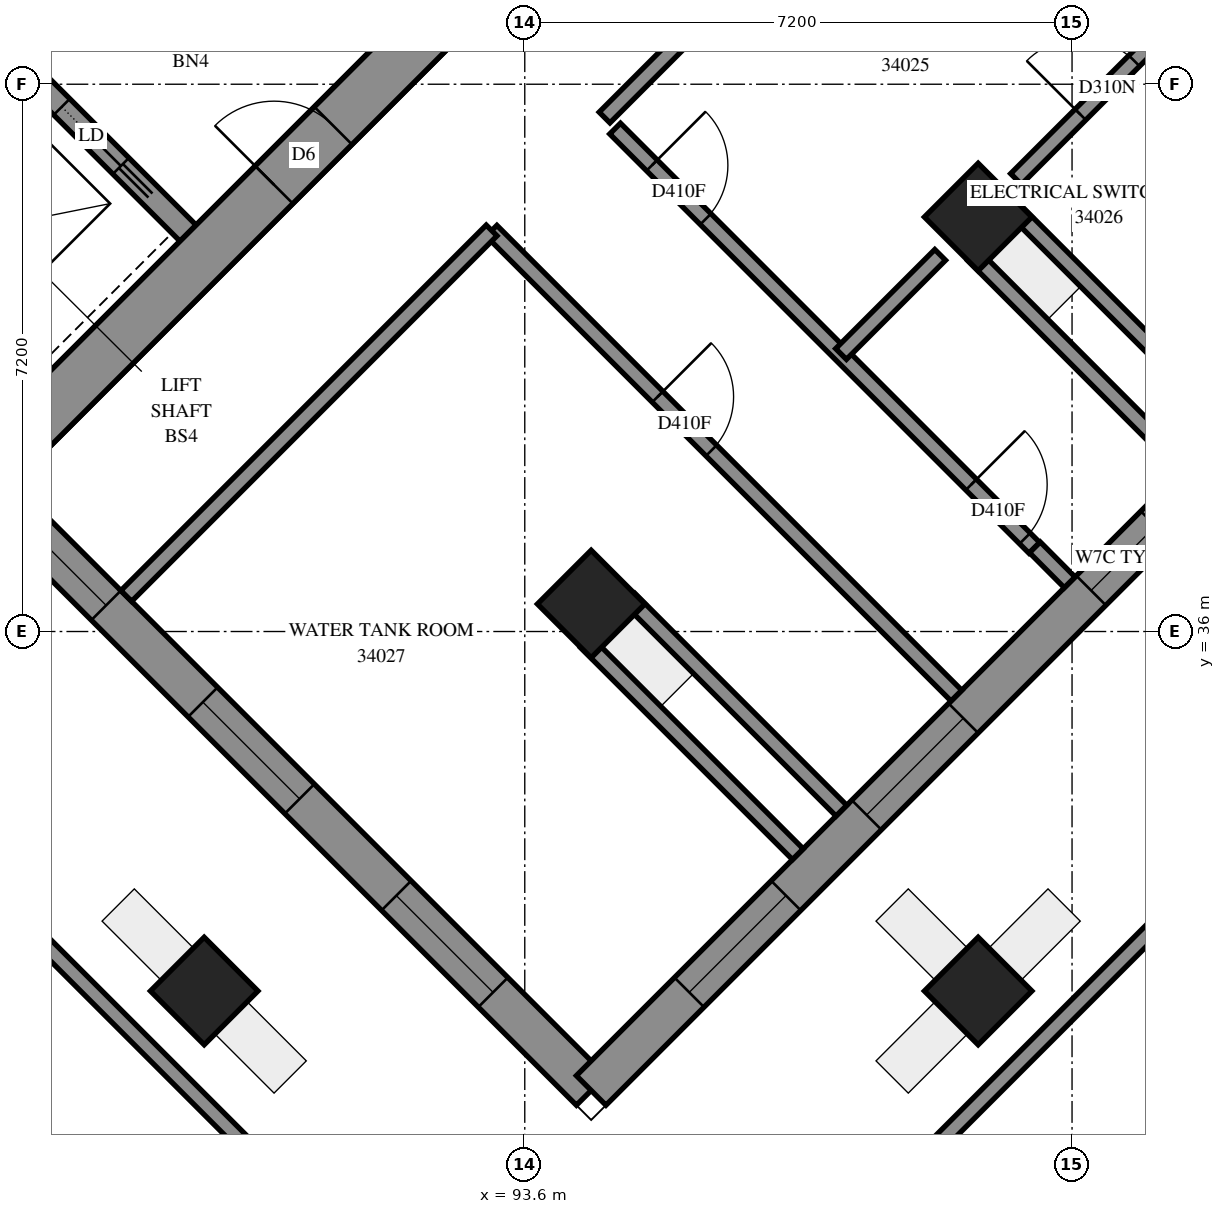
"""IFC4 building model, lengths in metres.
Left out: names, types, materials, properties, quantities, classifications, styles, units other than length and angle.
Written with IfcOpenShell. Run it as: python <this file> out.ifc"""

import sys

from ifc_helpers import new_model, si_unit, direction, frame, frame_2d, origin, origin_2d, place, context, subcontext, project, spatial, polyline, rectangle, outline, extrude, element, fill, save


model = new_model("IFC4")
c1 = context("Model", 3, precision=1e-05, world=origin(), true_north=direction((0.0, 1.0)))
c2 = subcontext(c1, "Body", "Model", "MODEL_VIEW")
j1 = project(units=[si_unit("LENGTHUNIT", "METRE"), si_unit("PLANEANGLEUNIT", "RADIAN")], contexts=[c1])
p1 = place(None, origin())
s1 = spatial("IfcSite", under=j1, at=p1, CompositionType="ELEMENT")
p2 = place(p1, origin())
s2 = spatial("IfcBuilding", under=s1, at=p2, CompositionType="ELEMENT")
p3 = place(p2, frame((0.0, 0.0, 126.2)))
s3 = spatial("IfcBuildingStorey", under=s2, at=p3, CompositionType="ELEMENT", Elevation=126.2)
for number, where, z_axis, x_axis in (
    (1, (99.565, 41.453, 0.0), (0.0, 0.0, 1.0), (0.707, -0.707, 0.0)),
    (2, (94.474, 36.362, 0.0), (0.0, 0.0, 1.0), (0.707, -0.707, 0.0)),
):
    element("IfcColumn", number, at=place(p3, frame(where, z_axis=z_axis, x_axis=x_axis)), inside=s3, PredefinedType="COLUMN", context=c2, shape_type="SweptSolid", body=[
        extrude(rectangle(XDim=1.0, YDim=1.0, at=origin_2d()), origin(), (0.0, 0.0, 1.0), 4.7),
    ])
for number, where, z_axis, x_axis in (
    (3, (89.382, 31.271, -0.3), (0.0, 0.0, 1.0), (0.707, -0.707, 0.0)),
    (4, (99.565, 31.271, -0.3), (0.0, 0.0, 1.0), (0.707, -0.707, 0.0)),
):
    element("IfcColumn", number, at=place(p3, frame(where, z_axis=z_axis, x_axis=x_axis)), inside=s3, PredefinedType="COLUMN", context=c2, shape_type="SweptSolid", body=[
        extrude(rectangle(XDim=1.0, YDim=1.0, at=origin_2d()), origin(), (0.0, 0.0, 1.0), 5.0),
    ])
p4 = place(p3, frame((87.084, 38.66, -0.3), z_axis=(0.0, 0.0, 1.0), x_axis=(0.7071067812, 0.7071067812, 0.0)))
e5 = element("IfcWall", 5, at=p4, inside=s3, PredefinedType="SHEAR", context=c2, shape_type="SweptSolid", body=[
    extrude(rectangle(XDim=14.4, YDim=0.7, at=frame_2d((7.2, 0.0))), origin(), (0.0, 0.0, 1.0), 4.3),
])
p5 = place(p4, frame((4.55, 0.0, 0.3)))
e6 = element("IfcOpeningElement", 6, at=p5, cuts=e5, PredefinedType="OPENING", context=c2, shape_type="SweptSolid", body=[
    extrude(rectangle(XDim=1.1, YDim=2.1, at=frame_2d((0.55, 1.05))), frame((0.0, 0.36, 0.0), z_axis=(0.0, -1.0, 0.0), x_axis=(1.0, 0.0, 0.0)), (0.0, 0.0, 1.0), 0.72),
])
p6 = place(p4, frame((11.35, 0.0, 0.3)))
e7 = element("IfcOpeningElement", 7, at=p6, cuts=e5, PredefinedType="OPENING", context=c2, shape_type="SweptSolid", body=[
    extrude(rectangle(XDim=1.1, YDim=2.1, at=frame_2d((0.55, 1.05))), frame((0.0, 0.36, 0.0), z_axis=(0.0, -1.0, 0.0), x_axis=(1.0, 0.0, 0.0)), (0.0, 0.0, 1.0), 0.72),
])
p7 = place(p3, frame((78.988, 51.423, 0.0), z_axis=(0.0, 0.0, 1.0), x_axis=(0.7071067812, -0.7071067812, 0.0)))
e8 = element("IfcWall", 8, at=p7, inside=s3, PredefinedType="SOLIDWALL", context=c2, shape_type="SweptSolid", body=[
    extrude(rectangle(XDim=14.4, YDim=0.3, at=frame_2d((7.2, 0.0))), origin(), (0.0, 0.0, 1.0), 4.7),
])
p8 = place(p7, frame((1.25, 0.0, 0.0)))
e9 = element("IfcOpeningElement", 9, at=p8, cuts=e8, PredefinedType="OPENING", context=c2, shape_type="SweptSolid", body=[
    extrude(rectangle(XDim=1.1, YDim=2.1, at=frame_2d((0.55, 1.05))), frame((0.0, 0.16, 0.0), z_axis=(0.0, -1.0, 0.0), x_axis=(1.0, 0.0, 0.0)), (0.0, 0.0, 1.0), 0.32),
])
p9 = place(p7, frame((4.85, 0.0, 0.0)))
e10 = element("IfcOpeningElement", 10, at=p9, cuts=e8, PredefinedType="OPENING", context=c2, shape_type="SweptSolid", body=[
    extrude(rectangle(XDim=1.1, YDim=2.1, at=frame_2d((0.55, 1.05))), frame((0.0, 0.16, 0.0), z_axis=(0.0, -1.0, 0.0), x_axis=(1.0, 0.0, 0.0)), (0.0, 0.0, 1.0), 0.32),
])
p10 = place(p7, frame((8.45, 0.0, 0.0)))
e11 = element("IfcOpeningElement", 11, at=p10, cuts=e8, PredefinedType="OPENING", context=c2, shape_type="SweptSolid", body=[
    extrude(rectangle(XDim=1.1, YDim=2.1, at=frame_2d((0.55, 1.05))), frame((0.0, 0.16, 0.0), z_axis=(0.0, -1.0, 0.0), x_axis=(1.0, 0.0, 0.0)), (0.0, 0.0, 1.0), 0.32),
])
p11 = place(p7, frame((12.05, 0.0, 0.0)))
e12 = element("IfcOpeningElement", 12, at=p11, cuts=e8, PredefinedType="OPENING", context=c2, shape_type="SweptSolid", body=[
    extrude(rectangle(XDim=1.1, YDim=2.1, at=frame_2d((0.55, 1.05))), frame((0.0, 0.16, 0.0), z_axis=(0.0, -1.0, 0.0), x_axis=(1.0, 0.0, 0.0)), (0.0, 0.0, 1.0), 0.32),
])
p12 = place(p3, frame((104.267, 43.15, 0.0), z_axis=(0.0, 0.0, 1.0), x_axis=(-0.7071054305, 0.7071081319, 0.0)))
e13 = element("IfcWall", 13, at=p12, inside=s3, PredefinedType="SOLIDWALL", context=c2, shape_type="SweptSolid", body=[
    extrude(outline(polyline([(-0.275, -0.275), (37.131, -0.275), (36.903, 0.275), (0.275, 0.275), (-0.275, -0.275)])), origin(), (0.0, 0.0, 1.0), 4.7),
])
p13 = place(p12, frame((3.325, 0.0, 0.9)))
e14 = element("IfcOpeningElement", 14, at=p13, cuts=e13, PredefinedType="OPENING", context=c2, shape_type="SweptSolid", body=[
    extrude(rectangle(XDim=1.8, YDim=2.4, at=frame_2d((0.9, 1.2))), frame((0.0, 0.285, 0.0), z_axis=(0.0, -1.0, 0.0), x_axis=(1.0, 0.0, 0.0)), (0.0, 0.0, 1.0), 0.57),
])
p14 = place(p12, frame((6.675, 0.0, 0.9)))
e15 = element("IfcOpeningElement", 15, at=p14, cuts=e13, PredefinedType="OPENING", context=c2, shape_type="SweptSolid", body=[
    extrude(rectangle(XDim=1.8, YDim=2.4, at=frame_2d((0.9, 1.2))), frame((0.0, 0.285, 0.0), z_axis=(0.0, -1.0, 0.0), x_axis=(1.0, 0.0, 0.0)), (0.0, 0.0, 1.0), 0.57),
])
p15 = place(p12, frame((24.625, 0.0, 0.9)))
e16 = element("IfcOpeningElement", 16, at=p15, cuts=e13, PredefinedType="OPENING", context=c2, shape_type="SweptSolid", body=[
    extrude(rectangle(XDim=1.8, YDim=2.4, at=frame_2d((0.9, 1.2))), frame((0.0, 0.285, 0.0), z_axis=(0.0, -1.0, 0.0), x_axis=(1.0, 0.0, 0.0)), (0.0, 0.0, 1.0), 0.57),
])
p16 = place(p12, frame((28.225, 0.0, 0.9)))
e17 = element("IfcOpeningElement", 17, at=p16, cuts=e13, PredefinedType="OPENING", context=c2, shape_type="SweptSolid", body=[
    extrude(rectangle(XDim=1.8, YDim=2.4, at=frame_2d((0.9, 1.2))), frame((0.0, 0.285, 0.0), z_axis=(0.0, -1.0, 0.0), x_axis=(1.0, 0.0, 0.0)), (0.0, 0.0, 1.0), 0.57),
])
p17 = place(p12, frame((31.825, 0.0, 0.9)))
e18 = element("IfcOpeningElement", 18, at=p17, cuts=e13, PredefinedType="OPENING", context=c2, shape_type="SweptSolid", body=[
    extrude(rectangle(XDim=1.8, YDim=2.4, at=frame_2d((0.9, 1.2))), frame((0.0, 0.285, 0.0), z_axis=(0.0, -1.0, 0.0), x_axis=(1.0, 0.0, 0.0)), (0.0, 0.0, 1.0), 0.57),
])
p18 = place(p12, frame((34.714, 0.0, 0.9)))
e19 = element("IfcOpeningElement", 19, at=p18, cuts=e13, PredefinedType="OPENING", context=c2, shape_type="SweptSolid", body=[
    extrude(rectangle(XDim=1.8, YDim=2.4, at=frame_2d((0.9, 1.2))), frame((0.0, 0.285, 0.0), z_axis=(0.0, -1.0, 0.0), x_axis=(1.0, 0.0, 0.0)), (0.0, 0.0, 1.0), 0.57),
])
p19 = place(p3, frame((78.561, 45.875, 0.0), z_axis=(0.0, 0.0, 1.0), x_axis=(0.7071067812, -0.7071067812, 0.0)))
e20 = element("IfcWall", 20, at=p19, inside=s3, PredefinedType="SOLIDWALL", context=c2, shape_type="SweptSolid", body=[
    extrude(outline(polyline([(0.114, -0.275), (22.779, -0.275), (22.229, 0.275), (-0.114, 0.275), (0.114, -0.275)])), origin(), (0.0, 0.0, 1.0), 4.7),
])
p20 = place(p19, frame((11.679, 0.0, 0.9)))
e21 = element("IfcOpeningElement", 21, at=p20, cuts=e20, PredefinedType="OPENING", context=c2, shape_type="SweptSolid", body=[
    extrude(rectangle(XDim=1.8, YDim=2.4, at=frame_2d((0.9, 1.2))), frame((0.0, 0.285, 0.0), z_axis=(0.0, -1.0, 0.0), x_axis=(1.0, 0.0, 0.0)), (0.0, 0.0, 1.0), 0.57),
])
p21 = place(p19, frame((15.279, 0.0, 0.9)))
e22 = element("IfcOpeningElement", 22, at=p21, cuts=e20, PredefinedType="OPENING", context=c2, shape_type="SweptSolid", body=[
    extrude(rectangle(XDim=1.8, YDim=2.4, at=frame_2d((0.9, 1.2))), frame((0.0, 0.285, 0.0), z_axis=(0.0, -1.0, 0.0), x_axis=(1.0, 0.0, 0.0)), (0.0, 0.0, 1.0), 0.57),
])
p22 = place(p19, frame((18.879, 0.0, 0.9)))
e23 = element("IfcOpeningElement", 23, at=p22, cuts=e20, PredefinedType="OPENING", context=c2, shape_type="SweptSolid", body=[
    extrude(rectangle(XDim=1.8, YDim=2.4, at=frame_2d((0.9, 1.2))), frame((0.0, 0.285, 0.0), z_axis=(0.0, -1.0, 0.0), x_axis=(1.0, 0.0, 0.0)), (0.0, 0.0, 1.0), 0.57),
])
p23 = place(p3, frame((94.474, 29.962, 0.0), z_axis=(0.0, 0.0, 1.0), x_axis=(0.7071067812, 0.7071067812, 0.0)))
e24 = element("IfcWall", 24, at=p23, inside=s3, PredefinedType="SOLIDWALL", context=c2, shape_type="SweptSolid", body=[
    extrude(outline(polyline([(-0.275, -0.275), (14.125, -0.275), (13.575, 0.275), (0.275, 0.275), (-0.275, -0.275)])), origin(), (0.0, 0.0, 1.0), 4.7),
])
p24 = place(p23, frame((1.825, 0.0, 0.9)))
e25 = element("IfcOpeningElement", 25, at=p24, cuts=e24, PredefinedType="OPENING", context=c2, shape_type="SweptSolid", body=[
    extrude(rectangle(XDim=1.8, YDim=2.4, at=frame_2d((0.9, 1.2))), frame((0.0, 0.285, 0.0), z_axis=(0.0, -1.0, 0.0), x_axis=(1.0, 0.0, 0.0)), (0.0, 0.0, 1.0), 0.57),
])
p25 = place(p23, frame((5.125, 0.0, 0.9)))
e26 = element("IfcOpeningElement", 26, at=p25, cuts=e24, PredefinedType="OPENING", context=c2, shape_type="SweptSolid", body=[
    extrude(rectangle(XDim=1.8, YDim=2.4, at=frame_2d((0.9, 1.2))), frame((0.0, 0.285, 0.0), z_axis=(0.0, -1.0, 0.0), x_axis=(1.0, 0.0, 0.0)), (0.0, 0.0, 1.0), 0.57),
])
p26 = place(p23, frame((9.302, 0.0, 0.7)))
e27 = element("IfcOpeningElement", 27, at=p26, cuts=e24, PredefinedType="OPENING", context=c2, shape_type="SweptSolid", body=[
    extrude(rectangle(XDim=1.2, YDim=2.3, at=frame_2d((0.6, 1.15))), frame((0.0, 0.285, 0.0), z_axis=(0.0, -1.0, 0.0), x_axis=(1.0, 0.0, 0.0)), (0.0, 0.0, 1.0), 0.57),
])
p27 = place(p3, frame((77.018, 42.15, 0.0), z_axis=(0.0, 0.0, 1.0), x_axis=(0.7071067812, -0.7071067812, 0.0)))
e28 = element("IfcWall", 28, at=p27, inside=s3, PredefinedType="SOLIDWALL", context=c2, shape_type="SweptSolid", body=[
    extrude(outline(polyline([(0.041, -0.1), (24.786, -0.1), (24.586, 0.1), (-0.041, 0.1), (0.041, -0.1)])), origin(), (0.0, 0.0, 1.0), 4.7),
])
p28 = place(p3, frame((94.474, 24.695, 0.0), z_axis=(0.0, 0.0, 1.0), x_axis=(0.7071067812, 0.7071067812, 0.0)))
e29 = element("IfcWall", 29, at=p28, inside=s3, PredefinedType="SOLIDWALL", context=c2, shape_type="SweptSolid", body=[
    extrude(outline(polyline([(-0.1, -0.1), (19.0, -0.1), (18.8, 0.1), (0.1, 0.1), (-0.1, -0.1)])), origin(), (0.0, 0.0, 1.0), 4.7),
])
p29 = place(p3, frame((93.163, 41.273, 0.0), z_axis=(0.0, 0.0, 1.0), x_axis=(0.7071010004, -0.7071125619, 0.0)))
e30 = element("IfcWall", 30, at=p29, inside=s3, PredefinedType="PARTITIONING", context=c2, shape_type="SweptSolid", body=[
    extrude(rectangle(XDim=8.649, YDim=0.2, at=frame_2d((4.325, 0.0))), origin(), (0.0, 0.0, 1.0), 4.7),
])
p30 = place(p29, frame((3.09, 0.0, 0.0)))
e31 = element("IfcOpeningElement", 31, at=p30, cuts=e30, PredefinedType="OPENING", context=c2, shape_type="SweptSolid", body=[
    extrude(rectangle(XDim=1.0, YDim=2.1, at=frame_2d((0.5, 1.05))), frame((0.0, 0.11, 0.0), z_axis=(0.0, -1.0, 0.0), x_axis=(1.0, 0.0, 0.0)), (0.0, 0.0, 1.0), 0.22),
])
p31 = place(p3, frame((94.788, 42.617, 0.0), z_axis=(0.0, 0.0, 1.0), x_axis=(0.7071067812, -0.7071067812, 0.0)))
e32 = element("IfcWall", 32, at=p31, inside=s3, PredefinedType="PARTITIONING", context=c2, shape_type="SweptSolid", body=[
    extrude(rectangle(XDim=7.801, YDim=0.2, at=frame_2d((3.9, 0.0))), origin(), (0.0, 0.0, 1.0), 4.7),
])
p32 = place(p31, frame((0.684, 0.0, 0.0)))
e33 = element("IfcOpeningElement", 33, at=p32, cuts=e32, PredefinedType="OPENING", context=c2, shape_type="SweptSolid", body=[
    extrude(rectangle(XDim=1.0, YDim=2.1, at=frame_2d((0.5, 1.05))), frame((0.0, 0.11, 0.0), z_axis=(0.0, -1.0, 0.0), x_axis=(1.0, 0.0, 0.0)), (0.0, 0.0, 1.0), 0.22),
])
p33 = place(p31, frame((6.625, 0.0, 0.0)))
e34 = element("IfcOpeningElement", 34, at=p33, cuts=e32, PredefinedType="OPENING", context=c2, shape_type="SweptSolid", body=[
    extrude(rectangle(XDim=1.0, YDim=2.1, at=frame_2d((0.5, 1.05))), frame((0.0, 0.11, 0.0), z_axis=(0.0, -1.0, 0.0), x_axis=(1.0, 0.0, 0.0)), (0.0, 0.0, 1.0), 0.22),
])
p34 = place(p3, frame((94.65, 42.762, 0.0), z_axis=(0.0, 0.0, 1.0), x_axis=(0.7071067812, 0.7071067812, 0.0)))
e35 = element("IfcWall", 35, at=p34, inside=s3, PredefinedType="PARTITIONING", context=c2, shape_type="SweptSolid", body=[
    extrude(rectangle(XDim=6.8, YDim=0.2, at=frame_2d((3.4, 0.0))), origin(), (0.0, 0.0, 1.0), 4.7),
])
p35 = place(p3, frame((88.357, 36.468, 0.0), z_axis=(0.0, 0.0, 1.0), x_axis=(0.7069523276, 0.707261201, 0.0)))
e36 = element("IfcWall", 36, at=p35, inside=s3, PredefinedType="PARTITIONING", context=c2, shape_type="SweptSolid", body=[
    extrude(rectangle(XDim=6.799, YDim=0.2, at=frame_2d((3.399, 0.0))), origin(), (0.0, 0.0, 1.0), 4.7),
])
p36 = place(p3, frame((99.497, 40.951, 0.0), z_axis=(0.0, 0.0, 1.0), x_axis=(0.7066881835, -0.7075251312, 0.0)))
e37 = element("IfcWall", 37, at=p36, inside=s3, PredefinedType="PARTITIONING", context=c2, shape_type="SweptSolid", body=[
    extrude(rectangle(XDim=3.943, YDim=0.2, at=frame_2d((1.971, 0.0))), origin(), (0.0, 0.0, 1.0), 4.7),
])
p37 = place(p3, frame((94.405, 35.859, 0.0), z_axis=(0.0, 0.0, 1.0), x_axis=(0.7071067812, -0.7071067812, 0.0)))
e38 = element("IfcWall", 38, at=p37, inside=s3, PredefinedType="PARTITIONING", context=c2, shape_type="SweptSolid", body=[
    extrude(rectangle(XDim=3.943, YDim=0.2, at=frame_2d((1.971, 0.0))), origin(), (0.0, 0.0, 1.0), 4.7),
])
p38 = place(p3, frame((94.977, 36.431, 0.0), z_axis=(0.0, 0.0, 1.0), x_axis=(0.7070941, -0.7071194621, 0.0)))
e39 = element("IfcWall", 39, at=p38, inside=s3, PredefinedType="PARTITIONING", context=c2, shape_type="SweptSolid", body=[
    extrude(rectangle(XDim=3.943, YDim=0.2, at=frame_2d((1.971, 0.0))), origin(), (0.0, 0.0, 1.0), 4.7),
])
p39 = place(p3, frame((100.063, 41.953, 0.0), z_axis=(0.0, 0.0, 1.0), x_axis=(0.7071067812, 0.7071067812, 0.0)))
e40 = element("IfcWall", 40, at=p39, inside=s3, PredefinedType="PARTITIONING", context=c2, shape_type="SweptSolid", body=[
    extrude(rectangle(XDim=3.544, YDim=0.2, at=frame_2d((1.772, 0.0))), origin(), (0.0, 0.0, 1.0), 4.7),
])
p40 = place(p39, frame((1.199, 0.0, 0.0)))
e41 = element("IfcOpeningElement", 41, at=p40, cuts=e40, PredefinedType="OPENING", context=c2, shape_type="SweptSolid", body=[
    extrude(rectangle(XDim=1.0, YDim=2.1, at=frame_2d((0.5, 1.05))), frame((0.0, 0.11, 0.0), z_axis=(0.0, -1.0, 0.0), x_axis=(1.0, 0.0, 0.0)), (0.0, 0.0, 1.0), 0.22),
])
p41 = place(p3, frame((100.067, 41.523, 0.0), z_axis=(0.0, 0.0, 1.0), x_axis=(0.7071067812, -0.7071067812, 0.0)))
e42 = element("IfcWall", 42, at=p41, inside=s3, PredefinedType="PARTITIONING", context=c2, shape_type="SweptSolid", body=[
    extrude(rectangle(XDim=3.295, YDim=0.2, at=frame_2d((1.648, 0.0))), origin(), (0.0, 0.0, 1.0), 4.7),
])
p42 = place(p3, frame((97.761, 39.651, 0.0), z_axis=(0.0, 0.0, 1.0), x_axis=(0.7071067812, 0.7071067812, 0.0)))
e43 = element("IfcWall", 43, at=p42, inside=s3, PredefinedType="PARTITIONING", context=c2, shape_type="SweptSolid", body=[
    extrude(rectangle(XDim=1.844, YDim=0.2, at=frame_2d((0.922, 0.0))), origin(), (0.0, 0.0, 1.0), 4.7),
])
p43 = place(p3, frame((100.311, 37.107, 0.0), z_axis=(0.0, 0.0, 1.0), x_axis=(0.7053327556, -0.7088763671, 0.0)))
e44 = element("IfcWall", 44, at=p43, inside=s3, PredefinedType="PARTITIONING", context=c2, shape_type="SweptSolid", body=[
    extrude(rectangle(XDim=0.649, YDim=0.2, at=frame_2d((0.325, 0.0))), origin(), (0.0, 0.0, 1.0), 4.7),
])
p44 = place(p20, origin())
e45 = element("IfcWindow", 45, at=p44, inside=s3, PartitioningType="SINGLE_PANEL", PredefinedType="WINDOW", context=c2, shape_type="SweptSolid", body=[
    extrude(rectangle(XDim=1.8, YDim=2.4, at=frame_2d((0.9, 1.2))), frame((0.0, 0.155, 0.0), z_axis=(0.0, -1.0, 0.0), x_axis=(1.0, 0.0, 0.0)), (0.0, 0.0, 1.0), 0.06),
])
fill(e21, e45)
p45 = place(p21, origin())
e46 = element("IfcWindow", 46, at=p45, inside=s3, PartitioningType="SINGLE_PANEL", PredefinedType="WINDOW", context=c2, shape_type="SweptSolid", body=[
    extrude(rectangle(XDim=1.8, YDim=2.4, at=frame_2d((0.9, 1.2))), frame((0.0, 0.155, 0.0), z_axis=(0.0, -1.0, 0.0), x_axis=(1.0, 0.0, 0.0)), (0.0, 0.0, 1.0), 0.06),
])
fill(e22, e46)
p46 = place(p22, origin())
e47 = element("IfcWindow", 47, at=p46, inside=s3, PartitioningType="SINGLE_PANEL", PredefinedType="WINDOW", context=c2, shape_type="SweptSolid", body=[
    extrude(rectangle(XDim=1.8, YDim=2.4, at=frame_2d((0.9, 1.2))), frame((0.0, 0.155, 0.0), z_axis=(0.0, -1.0, 0.0), x_axis=(1.0, 0.0, 0.0)), (0.0, 0.0, 1.0), 0.06),
])
fill(e23, e47)
p47 = place(p24, origin())
e48 = element("IfcWindow", 48, at=p47, inside=s3, PartitioningType="SINGLE_PANEL", PredefinedType="WINDOW", context=c2, shape_type="SweptSolid", body=[
    extrude(rectangle(XDim=1.8, YDim=2.4, at=frame_2d((0.9, 1.2))), frame((0.0, 0.155, 0.0), z_axis=(0.0, -1.0, 0.0), x_axis=(1.0, 0.0, 0.0)), (0.0, 0.0, 1.0), 0.06),
])
fill(e25, e48)
p48 = place(p25, origin())
e49 = element("IfcWindow", 49, at=p48, inside=s3, PartitioningType="SINGLE_PANEL", PredefinedType="WINDOW", context=c2, shape_type="SweptSolid", body=[
    extrude(rectangle(XDim=1.8, YDim=2.4, at=frame_2d((0.9, 1.2))), frame((0.0, 0.155, 0.0), z_axis=(0.0, -1.0, 0.0), x_axis=(1.0, 0.0, 0.0)), (0.0, 0.0, 1.0), 0.06),
])
fill(e26, e49)
p49 = place(p5, origin())
e50 = element("IfcDoor", 50, at=p49, inside=s3, OperationType="DOUBLE_DOOR_SINGLE_SWING", PredefinedType="DOOR", context=c2, shape_type="SweptSolid", body=[
    extrude(rectangle(XDim=1.1, YDim=2.1, at=frame_2d((0.55, 1.05))), frame((0.0, 0.025, 0.0), z_axis=(0.0, -1.0, 0.0), x_axis=(1.0, 0.0, 0.0)), (0.0, 0.0, 1.0), 0.05),
])
fill(e6, e50)
p50 = place(p11, origin())
e51 = element("IfcDoor", 51, at=p50, inside=s3, OperationType="SLIDING_TO_RIGHT", PredefinedType="DOOR", context=c2, shape_type="SweptSolid", body=[
    extrude(rectangle(XDim=1.1, YDim=2.1, at=frame_2d((0.55, 1.05))), frame((0.0, 0.025, 0.0), z_axis=(0.0, -1.0, 0.0), x_axis=(1.0, 0.0, 0.0)), (0.0, 0.0, 1.0), 0.05),
])
fill(e12, e51)
p51 = place(p32, origin())
e52 = element("IfcDoor", 52, at=p51, inside=s3, OperationType="SINGLE_SWING_RIGHT", PredefinedType="DOOR", context=c2, shape_type="SweptSolid", body=[
    extrude(rectangle(XDim=1.0, YDim=2.1, at=frame_2d((0.5, 1.05))), frame((0.0, 0.025, 0.0), z_axis=(0.0, -1.0, 0.0), x_axis=(1.0, 0.0, 0.0)), (0.0, 0.0, 1.0), 0.05),
])
fill(e33, e52)
p52 = place(p33, origin())
e53 = element("IfcDoor", 53, at=p52, inside=s3, OperationType="SINGLE_SWING_LEFT", PredefinedType="DOOR", context=c2, shape_type="SweptSolid", body=[
    extrude(rectangle(XDim=1.0, YDim=2.1, at=frame_2d((0.5, 1.05))), frame((0.0, 0.025, 0.0), z_axis=(0.0, -1.0, 0.0), x_axis=(1.0, 0.0, 0.0)), (0.0, 0.0, 1.0), 0.05),
])
fill(e34, e53)
p53 = place(p30, origin())
e54 = element("IfcDoor", 54, at=p53, inside=s3, OperationType="SINGLE_SWING_LEFT", PredefinedType="DOOR", context=c2, shape_type="SweptSolid", body=[
    extrude(rectangle(XDim=1.0, YDim=2.1, at=frame_2d((0.5, 1.05))), frame((0.0, 0.025, 0.0), z_axis=(0.0, -1.0, 0.0), x_axis=(1.0, 0.0, 0.0)), (0.0, 0.0, 1.0), 0.05),
])
fill(e31, e54)
p54 = place(p40, origin())
e55 = element("IfcDoor", 55, at=p54, inside=s3, OperationType="SINGLE_SWING_LEFT", PredefinedType="DOOR", context=c2, shape_type="SweptSolid", body=[
    extrude(rectangle(XDim=1.0, YDim=2.1, at=frame_2d((0.5, 1.05))), frame((0.0, 0.025, 0.0), z_axis=(0.0, -1.0, 0.0), x_axis=(1.0, 0.0, 0.0)), (0.0, 0.0, 1.0), 0.05),
])
fill(e41, e55)
p55 = place(p26, origin())
e56 = element("IfcWindow", 56, at=p55, inside=s3, PartitioningType="SINGLE_PANEL", PredefinedType="WINDOW", context=c2, shape_type="SweptSolid", body=[
    extrude(rectangle(XDim=1.2, YDim=2.3, at=frame_2d((0.6, 1.15))), frame((0.0, 0.155, 0.0), z_axis=(0.0, -1.0, 0.0), x_axis=(1.0, 0.0, 0.0)), (0.0, 0.0, 1.0), 0.06),
])
fill(e27, e56)
save(model, sys.argv[1])
